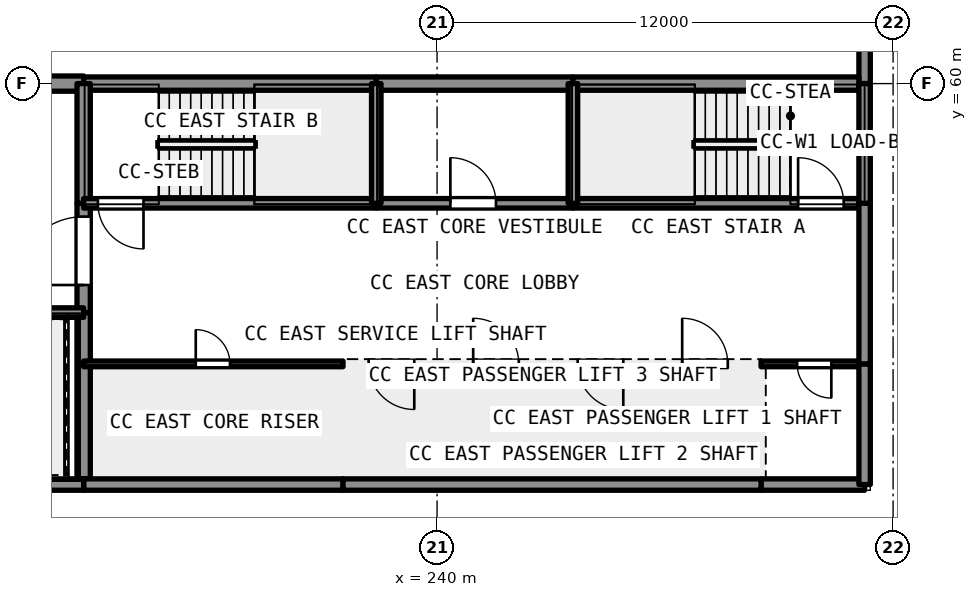
"""IFC4 building model, lengths in metres.
Left out: names, types, materials, properties, quantities, classifications, styles, units other than length and angle.
Written with IfcOpenShell. Run it as: python <this file> out.ifc"""

import sys

from ifc_helpers import new_model, si_unit, direction, frame, frame_2d, origin, place, context, subcontext, project, spatial, rectangle, extrude, element, fill, save


model = new_model("IFC4")
c1 = context("Model", 3, precision=1e-05, world=origin(), true_north=direction((0.0, 1.0)))
c2 = subcontext(c1, "Body", "Model", "MODEL_VIEW")
j1 = project(units=[si_unit("LENGTHUNIT", "METRE"), si_unit("PLANEANGLEUNIT", "RADIAN")], contexts=[c1])
p1 = place(None, origin())
s1 = spatial("IfcSite", under=j1, at=p1, CompositionType="ELEMENT")
p2 = place(p1, origin())
s2 = spatial("IfcBuilding", under=s1, at=p2, CompositionType="ELEMENT")
p3 = place(p2, frame((0.0, 0.0, 9.0)))
s3 = spatial("IfcBuildingStorey", under=s2, at=p3, CompositionType="ELEMENT", Elevation=9.0)
p4 = place(p3, frame((221.1, 60.0, 0.0), z_axis=(0.0, 0.0, 1.0), x_axis=(1.0, 0.0, 0.0)))
e1 = element("IfcWall", 1, at=p4, inside=s3, PredefinedType="SHEAR", context=c2, shape_type="SweptSolid", body=[
    extrude(rectangle(XDim=9.6, YDim=0.4, at=frame_2d((4.8, 0.0))), origin(), (0.0, 0.0, 1.0), 6.0),
])
p5 = place(p3, frame((251.25, 60.0, 0.0), z_axis=(0.0, 0.0, 1.0), x_axis=(0.0, 1.0, 0.0)))
e2 = element("IfcWall", 2, at=p5, inside=s3, PredefinedType="SOLIDWALL", context=c2, shape_type="SweptSolid", body=[
    extrude(rectangle(XDim=50.55, YDim=0.3, at=frame_2d((25.275, 0.0))), origin(), (0.0, 0.0, 1.0), 6.0),
])
p6 = place(p3, frame((230.7, 60.0, 0.0), z_axis=(0.0, 0.0, 1.0), x_axis=(1.0, 0.0, 0.0)))
e3 = element("IfcWall", 3, at=p6, inside=s3, PredefinedType="SHEAR", context=c2, shape_type="SweptSolid", body=[
    extrude(rectangle(XDim=7.7, YDim=0.35, at=frame_2d((3.85, 0.0))), origin(), (0.0, 0.0, 1.0), 5.59),
])
p7 = place(p3, frame((238.4, 60.0, 0.0), z_axis=(0.0, 0.0, 1.0), x_axis=(1.0, 0.0, 0.0)))
e4 = element("IfcWall", 4, at=p7, inside=s3, PredefinedType="SHEAR", context=c2, shape_type="SweptSolid", body=[
    extrude(rectangle(XDim=5.175, YDim=0.35, at=frame_2d((2.587, 0.0))), origin(), (0.0, 0.0, 1.0), 5.59),
])
p8 = place(p3, frame((243.575, 60.0, 0.0), z_axis=(0.0, 0.0, 1.0), x_axis=(1.0, 0.0, 0.0)))
e5 = element("IfcWall", 5, at=p8, inside=s3, PredefinedType="SHEAR", context=c2, shape_type="SweptSolid", body=[
    extrude(rectangle(XDim=7.525, YDim=0.35, at=frame_2d((3.763, 0.0))), origin(), (0.0, 0.0, 1.0), 5.59),
])
p9 = place(p3, frame((230.7, 49.6, 0.0), z_axis=(0.0, 0.0, 1.0), x_axis=(0.0, 1.0, 0.0)))
e6 = element("IfcWall", 6, at=p9, inside=s3, PredefinedType="SHEAR", context=c2, shape_type="SweptSolid", body=[
    extrude(rectangle(XDim=4.375, YDim=0.35, at=frame_2d((2.188, 0.0))), origin(), (0.0, 0.0, 1.0), 5.59),
])
p10 = place(p3, frame((230.7, 53.975, 0.0), z_axis=(0.0, 0.0, 1.0), x_axis=(0.0, 1.0, 0.0)))
e7 = element("IfcWall", 7, at=p10, inside=s3, PredefinedType="SHEAR", context=c2, shape_type="SweptSolid", body=[
    extrude(rectangle(XDim=2.875, YDim=0.35, at=frame_2d((1.438, 0.0))), origin(), (0.0, 0.0, 1.0), 5.59),
])
p11 = place(p10, frame((0.725, 0.0, 0.0)))
e8 = element("IfcOpeningElement", 8, at=p11, cuts=e7, PredefinedType="OPENING", context=c2, shape_type="SweptSolid", body=[
    extrude(rectangle(XDim=1.8, YDim=2.1, at=frame_2d((0.9, 1.05))), frame((0.0, 0.186, 0.0), z_axis=(0.0, -1.0, 0.0), x_axis=(1.0, 0.0, 0.0)), (0.0, 0.0, 1.0), 0.371),
])
p12 = place(p3, frame((230.7, 56.85, 0.0), z_axis=(0.0, 0.0, 1.0), x_axis=(0.0, 1.0, 0.0)))
e9 = element("IfcWall", 9, at=p12, inside=s3, PredefinedType="SHEAR", context=c2, shape_type="SweptSolid", body=[
    extrude(rectangle(XDim=3.15, YDim=0.35, at=frame_2d((1.575, 0.0))), origin(), (0.0, 0.0, 1.0), 5.59),
])
p13 = place(p3, frame((238.4, 56.85, 0.0), z_axis=(0.0, 0.0, 1.0), x_axis=(-1.0, 0.0, 0.0)))
e10 = element("IfcWall", 10, at=p13, inside=s3, PredefinedType="SHEAR", context=c2, shape_type="SweptSolid", body=[
    extrude(rectangle(XDim=7.7, YDim=0.25, at=frame_2d((3.85, 0.0))), origin(), (0.0, 0.0, 1.0), 5.59),
])
p14 = place(p13, frame((6.125, 0.0, 0.0)))
e11 = element("IfcOpeningElement", 11, at=p14, cuts=e10, PredefinedType="OPENING", context=c2, shape_type="SweptSolid", body=[
    extrude(rectangle(XDim=1.2, YDim=2.1, at=frame_2d((0.6, 1.05))), frame((0.0, 0.135, 0.0), z_axis=(0.0, -1.0, 0.0), x_axis=(1.0, 0.0, 0.0)), (0.0, 0.0, 1.0), 0.271),
])
p15 = place(p3, frame((243.575, 56.85, 0.0), z_axis=(0.0, 0.0, 1.0), x_axis=(-1.0, 0.0, 0.0)))
e12 = element("IfcWall", 12, at=p15, inside=s3, PredefinedType="SHEAR", context=c2, shape_type="SweptSolid", body=[
    extrude(rectangle(XDim=5.175, YDim=0.25, at=frame_2d((2.587, 0.0))), origin(), (0.0, 0.0, 1.0), 5.59),
])
p16 = place(p15, frame((2.025, 0.0, 0.0)))
e13 = element("IfcOpeningElement", 13, at=p16, cuts=e12, PredefinedType="OPENING", context=c2, shape_type="SweptSolid", body=[
    extrude(rectangle(XDim=1.2, YDim=2.1, at=frame_2d((0.6, 1.05))), frame((0.0, 0.135, 0.0), z_axis=(0.0, -1.0, 0.0), x_axis=(1.0, 0.0, 0.0)), (0.0, 0.0, 1.0), 0.271),
])
p17 = place(p3, frame((251.1, 56.85, 0.0), z_axis=(0.0, 0.0, 1.0), x_axis=(-1.0, 0.0, 0.0)))
e14 = element("IfcWall", 14, at=p17, inside=s3, PredefinedType="SHEAR", context=c2, shape_type="SweptSolid", body=[
    extrude(rectangle(XDim=7.525, YDim=0.25, at=frame_2d((3.763, 0.0))), origin(), (0.0, 0.0, 1.0), 5.59),
])
p18 = place(p17, frame((0.4, 0.0, 0.0)))
e15 = element("IfcOpeningElement", 15, at=p18, cuts=e14, PredefinedType="OPENING", context=c2, shape_type="SweptSolid", body=[
    extrude(rectangle(XDim=1.2, YDim=2.1, at=frame_2d((0.6, 1.05))), frame((0.0, 0.135, 0.0), z_axis=(0.0, -1.0, 0.0), x_axis=(1.0, 0.0, 0.0)), (0.0, 0.0, 1.0), 0.271),
])
for number, where, z_axis, x_axis in (
    (16, (243.575, 56.85, 0.0), (0.0, 0.0, 1.0), (0.0, 1.0, 0.0)),
    (17, (238.4, 56.85, 0.0), (0.0, 0.0, 1.0), (0.0, 1.0, 0.0)),
):
    element("IfcWall", number, at=place(p3, frame(where, z_axis=z_axis, x_axis=x_axis)), inside=s3, PredefinedType="SHEAR", context=c2, shape_type="SweptSolid", body=[
        extrude(rectangle(XDim=3.15, YDim=0.25, at=frame_2d((1.575, 0.0))), origin(), (0.0, 0.0, 1.0), 5.59),
    ])
p19 = place(p2, origin())
s4 = spatial("IfcBuildingStorey", under=s2, at=p19, CompositionType="ELEMENT", Elevation=0.0)
for number, where, z_axis, x_axis in (
    (18, (248.525, 49.6, -1.2), (0.0, 0.0, 1.0), (0.0, 1.0, 0.0)),
    (19, (245.775, 49.6, -1.2), (0.0, 0.0, 1.0), (0.0, 1.0, 0.0)),
    (20, (243.025, 49.6, -1.2), (0.0, 0.0, 1.0), (0.0, 1.0, 0.0)),
    (21, (240.275, 49.6, -1.2), (0.0, 0.0, 1.0), (0.0, 1.0, 0.0)),
    (22, (237.525, 49.6, -1.2), (0.0, 0.0, 1.0), (0.0, 1.0, 0.0)),
):
    element("IfcWall", number, at=place(p19, frame(where, z_axis=z_axis, x_axis=x_axis)), inside=s4, PredefinedType="SHEAR", context=c2, shape_type="SweptSolid", body=[
        extrude(rectangle(XDim=3.025, YDim=0.25, at=frame_2d((1.512, 0.0))), origin(), (0.0, 0.0, 1.0), 26.19),
    ])
p20 = place(p19, frame((237.525, 52.625, -1.2), z_axis=(0.0, 0.0, 1.0), x_axis=(1.0, 0.0, 0.0)))
e23 = element("IfcWall", 23, at=p20, inside=s4, PredefinedType="SHEAR", context=c2, shape_type="SweptSolid", body=[
    extrude(rectangle(XDim=11.0, YDim=0.25, at=frame_2d((5.5, 0.0))), origin(), (0.0, 0.0, 1.0), 26.19),
])
p21 = place(p20, frame((8.925, 0.0, 1.2)))
e24 = element("IfcOpeningElement", 24, at=p21, cuts=e23, PredefinedType="OPENING", context=c2, shape_type="SweptSolid", body=[
    extrude(rectangle(XDim=1.2, YDim=2.1, at=frame_2d((0.6, 1.05))), frame((0.0, 0.135, 0.0), z_axis=(0.0, -1.0, 0.0), x_axis=(1.0, 0.0, 0.0)), (0.0, 0.0, 1.0), 0.271),
])
p22 = place(p20, frame((6.175, 0.0, 1.2)))
e25 = element("IfcOpeningElement", 25, at=p22, cuts=e23, PredefinedType="OPENING", context=c2, shape_type="SweptSolid", body=[
    extrude(rectangle(XDim=1.2, YDim=2.1, at=frame_2d((0.6, 1.05))), frame((0.0, 0.135, 0.0), z_axis=(0.0, -1.0, 0.0), x_axis=(1.0, 0.0, 0.0)), (0.0, 0.0, 1.0), 0.271),
])
p23 = place(p20, frame((3.425, 0.0, 1.2)))
e26 = element("IfcOpeningElement", 26, at=p23, cuts=e23, PredefinedType="OPENING", context=c2, shape_type="SweptSolid", body=[
    extrude(rectangle(XDim=1.2, YDim=2.1, at=frame_2d((0.6, 1.05))), frame((0.0, 0.135, 0.0), z_axis=(0.0, -1.0, 0.0), x_axis=(1.0, 0.0, 0.0)), (0.0, 0.0, 1.0), 0.271),
])
p24 = place(p20, frame((0.675, 0.0, 1.2)))
e27 = element("IfcOpeningElement", 27, at=p24, cuts=e23, PredefinedType="OPENING", context=c2, shape_type="SweptSolid", body=[
    extrude(rectangle(XDim=1.2, YDim=2.1, at=frame_2d((0.6, 1.05))), frame((0.0, 0.135, 0.0), z_axis=(0.0, -1.0, 0.0), x_axis=(1.0, 0.0, 0.0)), (0.0, 0.0, 1.0), 0.271),
])
p25 = place(p20, frame((8.925, 0.0, 10.2)))
e28 = element("IfcOpeningElement", 28, at=p25, cuts=e23, PredefinedType="OPENING", context=c2, shape_type="SweptSolid", body=[
    extrude(rectangle(XDim=1.2, YDim=2.1, at=frame_2d((0.6, 1.05))), frame((0.0, 0.135, 0.0), z_axis=(0.0, -1.0, 0.0), x_axis=(1.0, 0.0, 0.0)), (0.0, 0.0, 1.0), 0.271),
])
p26 = place(p20, frame((6.175, 0.0, 10.2)))
e29 = element("IfcOpeningElement", 29, at=p26, cuts=e23, PredefinedType="OPENING", context=c2, shape_type="SweptSolid", body=[
    extrude(rectangle(XDim=1.2, YDim=2.1, at=frame_2d((0.6, 1.05))), frame((0.0, 0.135, 0.0), z_axis=(0.0, -1.0, 0.0), x_axis=(1.0, 0.0, 0.0)), (0.0, 0.0, 1.0), 0.271),
])
p27 = place(p20, frame((3.425, 0.0, 10.2)))
e30 = element("IfcOpeningElement", 30, at=p27, cuts=e23, PredefinedType="OPENING", context=c2, shape_type="SweptSolid", body=[
    extrude(rectangle(XDim=1.2, YDim=2.1, at=frame_2d((0.6, 1.05))), frame((0.0, 0.135, 0.0), z_axis=(0.0, -1.0, 0.0), x_axis=(1.0, 0.0, 0.0)), (0.0, 0.0, 1.0), 0.271),
])
p28 = place(p20, frame((0.675, 0.0, 10.2)))
e31 = element("IfcOpeningElement", 31, at=p28, cuts=e23, PredefinedType="OPENING", context=c2, shape_type="SweptSolid", body=[
    extrude(rectangle(XDim=1.2, YDim=2.1, at=frame_2d((0.6, 1.05))), frame((0.0, 0.135, 0.0), z_axis=(0.0, -1.0, 0.0), x_axis=(1.0, 0.0, 0.0)), (0.0, 0.0, 1.0), 0.271),
])
p29 = place(p20, frame((8.925, 0.0, 16.2)))
e32 = element("IfcOpeningElement", 32, at=p29, cuts=e23, PredefinedType="OPENING", context=c2, shape_type="SweptSolid", body=[
    extrude(rectangle(XDim=1.2, YDim=2.1, at=frame_2d((0.6, 1.05))), frame((0.0, 0.135, 0.0), z_axis=(0.0, -1.0, 0.0), x_axis=(1.0, 0.0, 0.0)), (0.0, 0.0, 1.0), 0.271),
])
p30 = place(p20, frame((6.175, 0.0, 16.2)))
e33 = element("IfcOpeningElement", 33, at=p30, cuts=e23, PredefinedType="OPENING", context=c2, shape_type="SweptSolid", body=[
    extrude(rectangle(XDim=1.2, YDim=2.1, at=frame_2d((0.6, 1.05))), frame((0.0, 0.135, 0.0), z_axis=(0.0, -1.0, 0.0), x_axis=(1.0, 0.0, 0.0)), (0.0, 0.0, 1.0), 0.271),
])
p31 = place(p20, frame((3.425, 0.0, 16.2)))
e34 = element("IfcOpeningElement", 34, at=p31, cuts=e23, PredefinedType="OPENING", context=c2, shape_type="SweptSolid", body=[
    extrude(rectangle(XDim=1.2, YDim=2.1, at=frame_2d((0.6, 1.05))), frame((0.0, 0.135, 0.0), z_axis=(0.0, -1.0, 0.0), x_axis=(1.0, 0.0, 0.0)), (0.0, 0.0, 1.0), 0.271),
])
p32 = place(p20, frame((0.675, 0.0, 16.2)))
e35 = element("IfcOpeningElement", 35, at=p32, cuts=e23, PredefinedType="OPENING", context=c2, shape_type="SweptSolid", body=[
    extrude(rectangle(XDim=1.2, YDim=2.1, at=frame_2d((0.6, 1.05))), frame((0.0, 0.135, 0.0), z_axis=(0.0, -1.0, 0.0), x_axis=(1.0, 0.0, 0.0)), (0.0, 0.0, 1.0), 0.271),
])
p33 = place(p20, frame((8.925, 0.0, 21.6)))
e36 = element("IfcOpeningElement", 36, at=p33, cuts=e23, PredefinedType="OPENING", context=c2, shape_type="SweptSolid", body=[
    extrude(rectangle(XDim=1.2, YDim=2.1, at=frame_2d((0.6, 1.05))), frame((0.0, 0.135, 0.0), z_axis=(0.0, -1.0, 0.0), x_axis=(1.0, 0.0, 0.0)), (0.0, 0.0, 1.0), 0.271),
])
p34 = place(p20, frame((6.175, 0.0, 21.6)))
e37 = element("IfcOpeningElement", 37, at=p34, cuts=e23, PredefinedType="OPENING", context=c2, shape_type="SweptSolid", body=[
    extrude(rectangle(XDim=1.2, YDim=2.1, at=frame_2d((0.6, 1.05))), frame((0.0, 0.135, 0.0), z_axis=(0.0, -1.0, 0.0), x_axis=(1.0, 0.0, 0.0)), (0.0, 0.0, 1.0), 0.271),
])
p35 = place(p20, frame((3.425, 0.0, 21.6)))
e38 = element("IfcOpeningElement", 38, at=p35, cuts=e23, PredefinedType="OPENING", context=c2, shape_type="SweptSolid", body=[
    extrude(rectangle(XDim=1.2, YDim=2.1, at=frame_2d((0.6, 1.05))), frame((0.0, 0.135, 0.0), z_axis=(0.0, -1.0, 0.0), x_axis=(1.0, 0.0, 0.0)), (0.0, 0.0, 1.0), 0.271),
])
p36 = place(p20, frame((0.675, 0.0, 21.6)))
e39 = element("IfcOpeningElement", 39, at=p36, cuts=e23, PredefinedType="OPENING", context=c2, shape_type="SweptSolid", body=[
    extrude(rectangle(XDim=1.2, YDim=2.1, at=frame_2d((0.6, 1.05))), frame((0.0, 0.135, 0.0), z_axis=(0.0, -1.0, 0.0), x_axis=(1.0, 0.0, 0.0)), (0.0, 0.0, 1.0), 0.271),
])
p37 = place(p19, frame((237.525, 49.725, -1.2), z_axis=(0.0, 0.0, 1.0), x_axis=(1.0, 0.0, 0.0)))
e40 = element("IfcWall", 40, at=p37, inside=s4, PredefinedType="SHEAR", context=c2, shape_type="SweptSolid", body=[
    extrude(rectangle(XDim=11.0, YDim=0.25, at=frame_2d((5.5, 0.0))), origin(), (0.0, 0.0, 1.0), 26.19),
])
p38 = place(p3, frame((248.525, 49.45, 0.0), z_axis=(0.0, 0.0, 1.0), x_axis=(1.0, 0.0, 0.0)))
e41 = element("IfcWall", 41, at=p38, inside=s3, PredefinedType="SOLIDWALL", context=c2, shape_type="SweptSolid", body=[
    extrude(rectangle(XDim=2.725, YDim=0.3, at=frame_2d((1.363, 0.0))), origin(), (0.0, 0.0, 1.0), 5.59),
])
p39 = place(p3, frame((251.1, 52.625, 0.0), z_axis=(0.0, 0.0, 1.0), x_axis=(-1.0, 0.0, 0.0)))
e42 = element("IfcWall", 42, at=p39, inside=s3, PredefinedType="PARTITIONING", context=c2, shape_type="SweptSolid", body=[
    extrude(rectangle(XDim=2.575, YDim=0.15, at=frame_2d((1.288, 0.0))), origin(), (0.0, 0.0, 1.0), 5.59),
])
p40 = place(p39, frame((0.725, 0.0, 0.0)))
e43 = element("IfcOpeningElement", 43, at=p40, cuts=e42, PredefinedType="OPENING", context=c2, shape_type="SweptSolid", body=[
    extrude(rectangle(XDim=0.9, YDim=2.1, at=frame_2d((0.45, 1.05))), frame((0.0, 0.085, 0.0), z_axis=(0.0, -1.0, 0.0), x_axis=(1.0, 0.0, 0.0)), (0.0, 0.0, 1.0), 0.171),
])
p41 = place(p3, frame((251.25, 49.45, 0.0), z_axis=(0.0, 0.0, 1.0), x_axis=(0.0, 1.0, 0.0)))
e44 = element("IfcWall", 44, at=p41, inside=s3, PredefinedType="SOLIDWALL", context=c2, shape_type="SweptSolid", body=[
    extrude(rectangle(XDim=3.175, YDim=0.3, at=frame_2d((1.587, 0.0))), origin(), (0.0, 0.0, 1.0), 5.59),
])
p42 = place(p3, frame((230.7, 49.45, 0.0), z_axis=(0.0, 0.0, 1.0), x_axis=(1.0, 0.0, 0.0)))
e45 = element("IfcWall", 45, at=p42, inside=s3, PredefinedType="SOLIDWALL", context=c2, shape_type="SweptSolid", body=[
    extrude(rectangle(XDim=6.825, YDim=0.3, at=frame_2d((3.413, 0.0))), origin(), (0.0, 0.0, 1.0), 5.59),
])
p43 = place(p3, frame((237.525, 52.625, 0.0), z_axis=(0.0, 0.0, 1.0), x_axis=(-1.0, 0.0, 0.0)))
e46 = element("IfcWall", 46, at=p43, inside=s3, PredefinedType="PARTITIONING", context=c2, shape_type="SweptSolid", body=[
    extrude(rectangle(XDim=6.825, YDim=0.15, at=frame_2d((3.413, 0.0))), origin(), (0.0, 0.0, 1.0), 5.59),
])
p44 = place(p43, frame((2.975, 0.0, 0.0)))
e47 = element("IfcOpeningElement", 47, at=p44, cuts=e46, PredefinedType="OPENING", context=c2, shape_type="SweptSolid", body=[
    extrude(rectangle(XDim=0.9, YDim=2.1, at=frame_2d((0.45, 1.05))), frame((0.0, 0.085, 0.0), z_axis=(0.0, -1.0, 0.0), x_axis=(1.0, 0.0, 0.0)), (0.0, 0.0, 1.0), 0.171),
])
p45 = place(p3, frame((221.275, 49.45, 0.0), z_axis=(0.0, 0.0, 1.0), x_axis=(1.0, 0.0, 0.0)))
e48 = element("IfcWall", 48, at=p45, inside=s3, PredefinedType="SOLIDWALL", context=c2, shape_type="SweptSolid", body=[
    extrude(rectangle(XDim=9.425, YDim=0.3, at=frame_2d((4.712, 0.0))), origin(), (0.0, 0.0, 1.0), 5.59),
])
p46 = place(p45, frame((3.125, 0.0, 0.9)))
e49 = element("IfcOpeningElement", 49, at=p46, cuts=e48, PredefinedType="OPENING", context=c2, shape_type="SweptSolid", body=[
    extrude(rectangle(XDim=2.4, YDim=1.8, at=frame_2d((1.2, 0.9))), frame((0.0, 0.161, 0.0), z_axis=(0.0, -1.0, 0.0), x_axis=(1.0, 0.0, 0.0)), (0.0, 0.0, 1.0), 0.321),
])
p47 = place(p3, frame((237.525, 49.45, 0.0), z_axis=(0.0, 0.0, 1.0), x_axis=(1.0, 0.0, 0.0)))
e50 = element("IfcWall", 50, at=p47, inside=s3, PredefinedType="SOLIDWALL", context=c2, shape_type="SweptSolid", body=[
    extrude(rectangle(XDim=11.0, YDim=0.3, at=frame_2d((5.5, 0.0))), origin(), (0.0, 0.0, 1.0), 5.59),
])
p48 = place(p3, frame((251.25, 52.625, 0.0), z_axis=(0.0, 0.0, 1.0), x_axis=(0.0, 1.0, 0.0)))
e51 = element("IfcWall", 51, at=p48, inside=s3, PredefinedType="SOLIDWALL", context=c2, shape_type="SweptSolid", body=[
    extrude(rectangle(XDim=4.225, YDim=0.3, at=frame_2d((2.113, 0.0))), origin(), (0.0, 0.0, 1.0), 5.59),
])
p49 = place(p3, frame((251.25, 56.85, 0.0), z_axis=(0.0, 0.0, 1.0), x_axis=(0.0, 1.0, 0.0)))
e52 = element("IfcWall", 52, at=p49, inside=s3, PredefinedType="SOLIDWALL", context=c2, shape_type="SweptSolid", body=[
    extrude(rectangle(XDim=3.15, YDim=0.3, at=frame_2d((1.575, 0.0))), origin(), (0.0, 0.0, 1.0), 5.59),
])
p50 = place(p3, frame((221.275, 53.975, 0.0), z_axis=(0.0, 0.0, 1.0), x_axis=(1.0, 0.0, 0.0)))
e53 = element("IfcWall", 53, at=p50, inside=s3, PredefinedType="SHEAR", context=c2, shape_type="SweptSolid", body=[
    extrude(rectangle(XDim=9.425, YDim=0.25, at=frame_2d((4.712, 0.0))), origin(), (0.0, 0.0, 1.0), 5.59),
])
p51 = place(p50, frame((0.425, 0.0, 0.0)))
e54 = element("IfcOpeningElement", 54, at=p51, cuts=e53, PredefinedType="OPENING", context=c2, shape_type="SweptSolid", body=[
    extrude(rectangle(XDim=2.4, YDim=2.1, at=frame_2d((1.2, 1.05))), frame((0.0, 0.135, 0.0), z_axis=(0.0, -1.0, 0.0), x_axis=(1.0, 0.0, 0.0)), (0.0, 0.0, 1.0), 0.271),
])
p52 = place(p11, origin())
e55 = element("IfcDoor", 55, at=p52, inside=s3, OperationType="DOUBLE_DOOR_SINGLE_SWING", PredefinedType="DOOR", context=c2, shape_type="SweptSolid", body=[
    extrude(rectangle(XDim=1.8, YDim=2.1, at=frame_2d((0.9, 1.05))), frame((0.0, 0.025, 0.0), z_axis=(0.0, -1.0, 0.0), x_axis=(1.0, 0.0, 0.0)), (0.0, 0.0, 1.0), 0.05),
])
fill(e8, e55)
p53 = place(p18, origin())
e56 = element("IfcDoor", 56, at=p53, inside=s3, OperationType="SINGLE_SWING_RIGHT", PredefinedType="DOOR", context=c2, shape_type="SweptSolid", body=[
    extrude(rectangle(XDim=1.2, YDim=2.1, at=frame_2d((0.6, 1.05))), frame((0.0, 0.025, 0.0), z_axis=(0.0, -1.0, 0.0), x_axis=(1.0, 0.0, 0.0)), (0.0, 0.0, 1.0), 0.05),
])
fill(e15, e56)
p54 = place(p14, origin())
e57 = element("IfcDoor", 57, at=p54, inside=s3, OperationType="SINGLE_SWING_LEFT", PredefinedType="DOOR", context=c2, shape_type="SweptSolid", body=[
    extrude(rectangle(XDim=1.2, YDim=2.1, at=frame_2d((0.6, 1.05))), frame((0.0, 0.025, 0.0), z_axis=(0.0, -1.0, 0.0), x_axis=(1.0, 0.0, 0.0)), (0.0, 0.0, 1.0), 0.05),
])
fill(e11, e57)
p55 = place(p16, origin())
e58 = element("IfcDoor", 58, at=p55, inside=s3, OperationType="SINGLE_SWING_RIGHT", PredefinedType="DOOR", context=c2, shape_type="SweptSolid", body=[
    extrude(rectangle(XDim=1.2, YDim=2.1, at=frame_2d((0.6, 1.05))), frame((0.0, 0.025, 0.0), z_axis=(0.0, -1.0, 0.0), x_axis=(1.0, 0.0, 0.0)), (0.0, 0.0, 1.0), 0.05),
])
fill(e13, e58)
p56 = place(p25, origin())
e59 = element("IfcDoor", 59, at=p56, inside=s3, OperationType="SLIDING_TO_LEFT", PredefinedType="DOOR", context=c2, shape_type="SweptSolid", body=[
    extrude(rectangle(XDim=1.2, YDim=2.1, at=frame_2d((0.6, 1.05))), frame((0.0, 0.025, 0.0), z_axis=(0.0, -1.0, 0.0), x_axis=(1.0, 0.0, 0.0)), (0.0, 0.0, 1.0), 0.05),
])
fill(e28, e59)
p57 = place(p26, origin())
e60 = element("IfcDoor", 60, at=p57, inside=s3, OperationType="SLIDING_TO_RIGHT", PredefinedType="DOOR", context=c2, shape_type="SweptSolid", body=[
    extrude(rectangle(XDim=1.2, YDim=2.1, at=frame_2d((0.6, 1.05))), frame((0.0, 0.025, 0.0), z_axis=(0.0, -1.0, 0.0), x_axis=(1.0, 0.0, 0.0)), (0.0, 0.0, 1.0), 0.05),
])
fill(e29, e60)
p58 = place(p27, origin())
e61 = element("IfcDoor", 61, at=p58, inside=s3, OperationType="SLIDING_TO_LEFT", PredefinedType="DOOR", context=c2, shape_type="SweptSolid", body=[
    extrude(rectangle(XDim=1.2, YDim=2.1, at=frame_2d((0.6, 1.05))), frame((0.0, 0.025, 0.0), z_axis=(0.0, -1.0, 0.0), x_axis=(1.0, 0.0, 0.0)), (0.0, 0.0, 1.0), 0.05),
])
fill(e30, e61)
p59 = place(p28, origin())
e62 = element("IfcDoor", 62, at=p59, inside=s3, OperationType="SLIDING_TO_RIGHT", PredefinedType="DOOR", context=c2, shape_type="SweptSolid", body=[
    extrude(rectangle(XDim=1.2, YDim=2.1, at=frame_2d((0.6, 1.05))), frame((0.0, 0.025, 0.0), z_axis=(0.0, -1.0, 0.0), x_axis=(1.0, 0.0, 0.0)), (0.0, 0.0, 1.0), 0.05),
])
fill(e31, e62)
p60 = place(p40, origin())
e63 = element("IfcDoor", 63, at=p60, inside=s3, OperationType="SINGLE_SWING_LEFT", PredefinedType="DOOR", context=c2, shape_type="SweptSolid", body=[
    extrude(rectangle(XDim=0.9, YDim=2.1, at=frame_2d((0.45, 1.05))), frame((0.0, 0.025, 0.0), z_axis=(0.0, -1.0, 0.0), x_axis=(1.0, 0.0, 0.0)), (0.0, 0.0, 1.0), 0.05),
])
fill(e43, e63)
p61 = place(p44, origin())
e64 = element("IfcDoor", 64, at=p61, inside=s3, OperationType="SINGLE_SWING_RIGHT", PredefinedType="DOOR", context=c2, shape_type="SweptSolid", body=[
    extrude(rectangle(XDim=0.9, YDim=2.1, at=frame_2d((0.45, 1.05))), frame((0.0, 0.025, 0.0), z_axis=(0.0, -1.0, 0.0), x_axis=(1.0, 0.0, 0.0)), (0.0, 0.0, 1.0), 0.05),
])
fill(e47, e64)
save(model, sys.argv[1])
